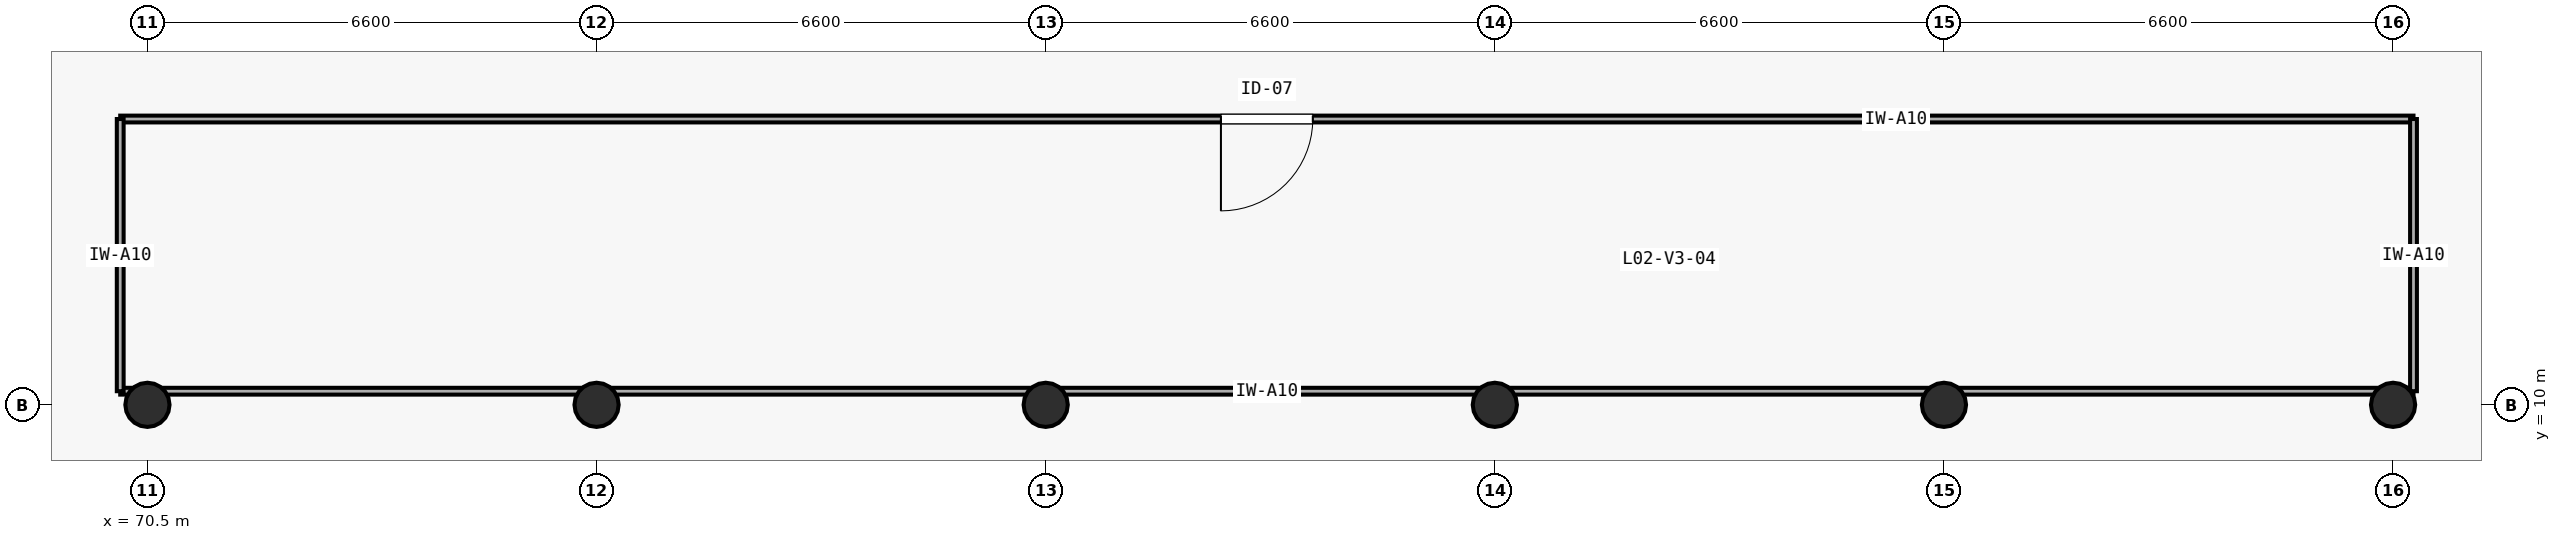
"""IFC4 building model, lengths in metres.
Left out: names, types, materials, properties, quantities, classifications, styles, units other than length and angle.
Written with IfcOpenShell. Run it as: python <this file> out.ifc"""

import sys

from ifc_helpers import new_model, si_unit, direction, frame, frame_2d, origin, origin_2d, place, context, subcontext, project, spatial, rectangle, circle, extrude, element, fill, save


model = new_model("IFC4")
c1 = context("Model", 3, precision=1e-05, world=origin(), true_north=direction((0.0, 1.0)))
c2 = subcontext(c1, "Body", "Model", "MODEL_VIEW")
j1 = project(units=[si_unit("LENGTHUNIT", "METRE"), si_unit("PLANEANGLEUNIT", "RADIAN")], contexts=[c1])
p1 = place(None, origin())
s1 = spatial("IfcSite", under=j1, at=p1, CompositionType="ELEMENT")
p2 = place(p1, origin())
s2 = spatial("IfcBuilding", under=s1, at=p2, CompositionType="ELEMENT")
p3 = place(p2, frame((0.0, 0.0, 8.4)))
s3 = spatial("IfcBuildingStorey", under=s2, at=p3, CompositionType="ELEMENT", Elevation=8.4)
for number, where, z_axis, x_axis in (
    (1, (70.5, 10.0, 0.0), (0.0, 0.0, 1.0), (1.0, 0.0, 0.0)),
    (2, (77.1, 10.0, 0.0), (0.0, 0.0, 1.0), (1.0, 0.0, 0.0)),
    (3, (83.7, 10.0, 0.0), (0.0, 0.0, 1.0), (1.0, 0.0, 0.0)),
    (4, (90.3, 10.0, 0.0), (0.0, 0.0, 1.0), (1.0, 0.0, 0.0)),
    (5, (96.9, 10.0, 0.0), (0.0, 0.0, 1.0), (1.0, 0.0, 0.0)),
    (6, (103.5, 10.0, 0.0), (0.0, 0.0, 1.0), (1.0, 0.0, 0.0)),
):
    element("IfcColumn", number, at=place(p3, frame(where, z_axis=z_axis, x_axis=x_axis)), inside=s3, PredefinedType="COLUMN", context=c2, shape_type="SweptSolid", body=[
        extrude(circle(Radius=0.325, at=origin_2d()), origin(), (0.0, 0.0, 1.0), 4.2),
    ])
p4 = place(p3, frame((70.1, 10.2, 0.0), z_axis=(0.0, 0.0, 1.0), x_axis=(1.0, 0.0, 0.0)))
e7 = element("IfcWall", 7, at=p4, inside=s3, PredefinedType="PARTITIONING", context=c2, shape_type="SweptSolid", body=[
    extrude(rectangle(XDim=33.7, YDim=0.1, at=frame_2d((16.85, 0.0))), origin(), (0.0, 0.0, 1.0), 3.235),
])
p5 = place(p3, frame((70.1, 14.2, 0.0), z_axis=(0.0, 0.0, 1.0), x_axis=(1.0, 0.0, 0.0)))
e8 = element("IfcWall", 8, at=p5, inside=s3, PredefinedType="PARTITIONING", context=c2, shape_type="SweptSolid", body=[
    extrude(rectangle(XDim=33.7, YDim=0.1, at=frame_2d((16.85, 0.0))), origin(), (0.0, 0.0, 1.0), 3.9),
])
p6 = place(p5, frame((16.175, 0.0, 0.0)))
e9 = element("IfcOpeningElement", 9, at=p6, cuts=e8, PredefinedType="OPENING", context=c2, shape_type="SweptSolid", body=[
    extrude(rectangle(XDim=1.35, YDim=2.2, at=frame_2d((0.675, 1.1))), frame((0.0, 0.06, 0.0), z_axis=(0.0, -1.0, 0.0), x_axis=(1.0, 0.0, 0.0)), (0.0, 0.0, 1.0), 0.12),
])
p7 = place(p3, frame((70.1, 10.2, 0.0), z_axis=(0.0, 0.0, 1.0), x_axis=(0.0, 1.0, 0.0)))
e10 = element("IfcWall", 10, at=p7, inside=s3, PredefinedType="PARTITIONING", context=c2, shape_type="SweptSolid", body=[
    extrude(rectangle(XDim=4.0, YDim=0.1, at=frame_2d((2.0, 0.0))), origin(), (0.0, 0.0, 1.0), 3.9),
])
p8 = place(p3, frame((103.8, 10.2, 0.0), z_axis=(0.0, 0.0, 1.0), x_axis=(0.0, 1.0, 0.0)))
e11 = element("IfcWall", 11, at=p8, inside=s3, PredefinedType="PARTITIONING", context=c2, shape_type="SweptSolid", body=[
    extrude(rectangle(XDim=4.0, YDim=0.1, at=frame_2d((2.0, 0.0))), origin(), (0.0, 0.0, 1.0), 3.545),
])
p9 = place(p6, frame((1.35, 0.0, 0.0), z_axis=(0.0, 0.0, 1.0), x_axis=(-1.0, 0.0, 0.0)))
e12 = element("IfcDoor", 12, at=p9, inside=s3, OperationType="SINGLE_SWING_RIGHT", PredefinedType="DOOR", context=c2, shape_type="SweptSolid", body=[
    extrude(rectangle(XDim=1.35, YDim=2.2, at=frame_2d((0.675, 1.1))), frame((0.0, 0.025, 0.0), z_axis=(0.0, -1.0, 0.0), x_axis=(1.0, 0.0, 0.0)), (0.0, 0.0, 1.0), 0.05),
])
fill(e9, e12)
save(model, sys.argv[1])
